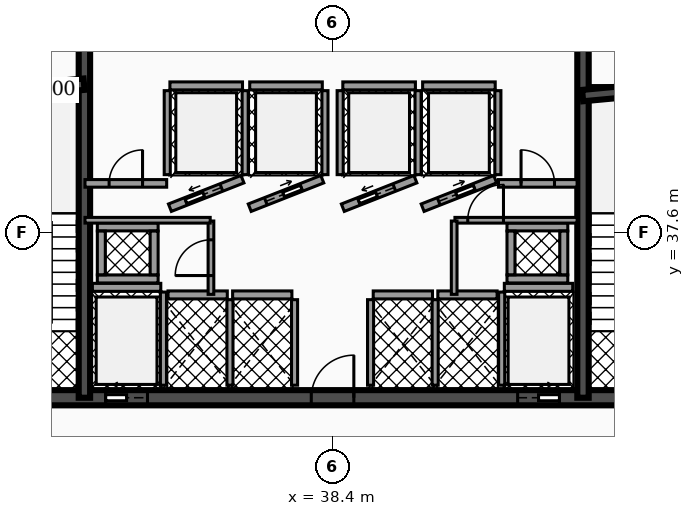
"""IFC4 building model, lengths in metres.
Left out: names, types, materials, properties, quantities, classifications, styles, units other than length and angle.
Written with IfcOpenShell. Run it as: python <this file> out.ifc"""

import sys

from ifc_helpers import new_model, si_unit, direction, frame, frame_2d, origin, place, context, subcontext, project, spatial, rectangle, extrude, element, fill, save


model = new_model("IFC4")
c1 = context("Model", 3, precision=1e-05, world=origin(), true_north=direction((0.0, 1.0)))
c2 = subcontext(c1, "Body", "Model", "MODEL_VIEW")
j1 = project(units=[si_unit("LENGTHUNIT", "METRE"), si_unit("PLANEANGLEUNIT", "RADIAN")], contexts=[c1])
p1 = place(None, origin())
s1 = spatial("IfcSite", under=j1, at=p1, CompositionType="ELEMENT")
p2 = place(p1, origin())
s2 = spatial("IfcBuilding", under=s1, at=p2, CompositionType="ELEMENT")
p3 = place(p2, frame((0.0, 0.0, 100.98)))
s3 = spatial("IfcBuildingStorey", under=s2, at=p3, CompositionType="ELEMENT", Elevation=100.98)
p4 = place(p3, frame((28.4, 33.25, 0.0), z_axis=(0.0, 0.0, 1.0), x_axis=(1.0, 0.0, 0.0)))
e1 = element("IfcWall", 1, at=p4, inside=s3, PredefinedType="SHEAR", context=c2, shape_type="SweptSolid", body=[
    extrude(rectangle(XDim=20.06, YDim=0.4, at=frame_2d((10.03, 0.0))), origin(), (0.0, 0.0, 1.0), 3.82),
])
p5 = place(p4, frame((4.03, 0.0, 0.0)))
e2 = element("IfcOpeningElement", 2, at=p5, cuts=e1, PredefinedType="OPENING", context=c2, shape_type="SweptSolid", body=[
    extrude(rectangle(XDim=1.1, YDim=2.15, at=frame_2d((0.55, 1.075))), frame((0.0, 0.21, 0.0), z_axis=(0.0, -1.0, 0.0), x_axis=(1.0, 0.0, 0.0)), (0.0, 0.0, 1.0), 0.42),
])
p6 = place(p4, frame((14.87, 0.0, 0.0)))
e3 = element("IfcOpeningElement", 3, at=p6, cuts=e1, PredefinedType="OPENING", context=c2, shape_type="SweptSolid", body=[
    extrude(rectangle(XDim=1.1, YDim=2.15, at=frame_2d((0.55, 1.075))), frame((0.0, 0.21, 0.0), z_axis=(0.0, -1.0, 0.0), x_axis=(1.0, 0.0, 0.0)), (0.0, 0.0, 1.0), 0.42),
])
p7 = place(p4, frame((1.31, 0.0, 0.0)))
e4 = element("IfcOpeningElement", 4, at=p7, cuts=e1, PredefinedType="OPENING", context=c2, shape_type="SweptSolid", body=[
    extrude(rectangle(XDim=1.1, YDim=2.2, at=frame_2d((0.55, 1.1))), frame((0.0, 0.21, 0.0), z_axis=(0.0, -1.0, 0.0), x_axis=(1.0, 0.0, 0.0)), (0.0, 0.0, 1.0), 0.42),
])
p8 = place(p4, frame((9.44, 0.0, 0.0)))
e5 = element("IfcOpeningElement", 5, at=p8, cuts=e1, PredefinedType="OPENING", context=c2, shape_type="SweptSolid", body=[
    extrude(rectangle(XDim=1.12, YDim=2.05, at=frame_2d((0.56, 1.025))), frame((0.0, 0.21, 0.0), z_axis=(0.0, -1.0, 0.0), x_axis=(1.0, 0.0, 0.0)), (0.0, 0.0, 1.0), 0.42),
])
p9 = place(p4, frame((17.65, 0.0, 0.0)))
e6 = element("IfcOpeningElement", 6, at=p9, cuts=e1, PredefinedType="OPENING", context=c2, shape_type="SweptSolid", body=[
    extrude(rectangle(XDim=1.1, YDim=2.2, at=frame_2d((0.55, 1.1))), frame((0.0, 0.21, 0.0), z_axis=(0.0, -1.0, 0.0), x_axis=(1.0, 0.0, 0.0)), (0.0, 0.0, 1.0), 0.42),
])
for number, where, z_axis, x_axis in (
    (7, (31.87, 33.25, 0.0), (0.0, 0.0, 1.0), (0.0, 1.0, 0.0)),
    (8, (44.99, 33.25, 0.0), (0.0, 0.0, 1.0), (0.0, 1.0, 0.0)),
):
    element("IfcWall", number, at=place(p3, frame(where, z_axis=z_axis, x_axis=x_axis)), inside=s3, PredefinedType="SHEAR", context=c2, shape_type="SweptSolid", body=[
        extrude(rectangle(XDim=10.2, YDim=0.3, at=frame_2d((5.1, 0.0))), origin(), (0.0, 0.0, 1.0), 3.82),
    ])
p10 = place(p3, frame((28.64, 41.2, 0.0), z_axis=(0.0, 0.0, 1.0), x_axis=(0.995687118776, 0.092774789157, 0.0)))
e9 = element("IfcWall", 9, at=p10, inside=s3, PredefinedType="SHEAR", context=c2, shape_type="SweptSolid", body=[
    extrude(rectangle(XDim=3.234, YDim=0.3, at=frame_2d((1.617, 0.0))), origin(), (0.0, 0.0, 1.0), 3.82),
])
p11 = place(p3, frame((44.98, 41.2, 0.0), z_axis=(0.0, 0.0, 1.0), x_axis=(0.995686468965, 0.09278176286, 0.0)))
e10 = element("IfcWall", 10, at=p11, inside=s3, PredefinedType="SHEAR", context=c2, shape_type="SweptSolid", body=[
    extrude(rectangle(XDim=3.234, YDim=0.3, at=frame_2d((1.617, 0.0))), origin(), (0.0, 0.0, 1.0), 3.82),
])
p12 = place(p3, frame((32.08, 36.155, 0.0), z_axis=(0.0, 0.0, 1.0), x_axis=(1.0, 0.0, 0.0)))
e11 = element("IfcWall", 11, at=p12, inside=s3, PredefinedType="SOLIDWALL", context=c2, shape_type="SweptSolid", body=[
    extrude(rectangle(XDim=1.8, YDim=0.21, at=frame_2d((0.9, 0.0))), origin(), (0.0, 0.0, 1.0), 2.792),
])
p13 = place(p3, frame((33.95, 33.58, 0.0), z_axis=(0.0, 0.0, 1.0), x_axis=(0.0, 1.0, 0.0)))
e12 = element("IfcWall", 12, at=p13, inside=s3, PredefinedType="SOLIDWALL", context=c2, shape_type="SweptSolid", body=[
    extrude(rectangle(XDim=2.45, YDim=0.16, at=frame_2d((1.225, 0.0))), origin(), (0.0, 0.0, 1.0), 2.792),
])
p14 = place(p3, frame((42.92, 36.155, 0.0), z_axis=(0.0, 0.0, 1.0), x_axis=(1.0, 0.0, 0.0)))
e13 = element("IfcWall", 13, at=p14, inside=s3, PredefinedType="SOLIDWALL", context=c2, shape_type="SweptSolid", body=[
    extrude(rectangle(XDim=1.8, YDim=0.21, at=frame_2d((0.9, 0.0))), origin(), (0.0, 0.0, 1.0), 2.792),
])
p15 = place(p3, frame((42.85, 33.58, 0.0), z_axis=(0.0, 0.0, 1.0), x_axis=(0.0, 1.0, 0.0)))
e14 = element("IfcWall", 14, at=p15, inside=s3, PredefinedType="SOLIDWALL", context=c2, shape_type="SweptSolid", body=[
    extrude(rectangle(XDim=2.45, YDim=0.16, at=frame_2d((1.225, 0.0))), origin(), (0.0, 0.0, 1.0), 2.792),
])
p16 = place(p3, frame((34.12, 38.25, 0.0), z_axis=(0.0, 0.0, 1.0), x_axis=(0.930804993012, 0.36551616241, 0.0)))
e15 = element("IfcWall", 15, at=p16, inside=s3, PredefinedType="SOLIDWALL", context=c2, shape_type="SweptSolid", body=[
    extrude(rectangle(XDim=2.052, YDim=0.21, at=frame_2d((1.026, 0.0))), origin(), (0.0, 0.0, 1.0), 2.792),
])
p17 = place(p16, frame((0.455, 0.0, 0.0)))
e16 = element("IfcOpeningElement", 16, at=p17, cuts=e15, PredefinedType="OPENING", context=c2, shape_type="SweptSolid", body=[
    extrude(rectangle(XDim=1.0, YDim=2.1, at=frame_2d((0.5, 1.05))), frame((0.0, 0.115, 0.0), z_axis=(0.0, -1.0, 0.0), x_axis=(1.0, 0.0, 0.0)), (0.0, 0.0, 1.0), 0.23),
])
p18 = place(p3, frame((34.12, 41.455, 0.0), z_axis=(0.0, 0.0, 1.0), x_axis=(1.0, 0.0, 0.0)))
e17 = element("IfcWall", 17, at=p18, inside=s3, PredefinedType="SOLIDWALL", context=c2, shape_type="SweptSolid", body=[
    extrude(rectangle(XDim=1.91, YDim=0.21, at=frame_2d((0.955, 0.0))), origin(), (0.0, 0.0, 1.0), 2.792),
])
for number, where, z_axis, x_axis in (
    (18, (34.05, 39.12, 0.0), (0.0, 0.0, 1.0), (0.0, 1.0, 0.0)),
    (19, (36.1, 39.12, 0.0), (0.0, 0.0, 1.0), (0.0, 1.0, 0.0)),
):
    element("IfcWall", number, at=place(p3, frame(where, z_axis=z_axis, x_axis=x_axis)), inside=s3, PredefinedType="SOLIDWALL", context=c2, shape_type="SweptSolid", body=[
        extrude(rectangle(XDim=2.21, YDim=0.16, at=frame_2d((1.105, 0.0))), origin(), (0.0, 0.0, 1.0), 2.792),
    ])
p19 = place(p3, frame((36.22, 38.25, 0.0), z_axis=(0.0, 0.0, 1.0), x_axis=(0.930804993012, 0.36551616241, 0.0)))
e20 = element("IfcWall", 20, at=p19, inside=s3, PredefinedType="SOLIDWALL", context=c2, shape_type="SweptSolid", body=[
    extrude(rectangle(XDim=2.052, YDim=0.21, at=frame_2d((1.026, 0.0))), origin(), (0.0, 0.0, 1.0), 2.792),
])
p20 = place(p19, frame((0.455, 0.0, 0.0)))
e21 = element("IfcOpeningElement", 21, at=p20, cuts=e20, PredefinedType="OPENING", context=c2, shape_type="SweptSolid", body=[
    extrude(rectangle(XDim=1.0, YDim=2.1, at=frame_2d((0.5, 1.05))), frame((0.0, 0.115, 0.0), z_axis=(0.0, -1.0, 0.0), x_axis=(1.0, 0.0, 0.0)), (0.0, 0.0, 1.0), 0.23),
])
p21 = place(p3, frame((36.22, 41.455, 0.0), z_axis=(0.0, 0.0, 1.0), x_axis=(1.0, 0.0, 0.0)))
e22 = element("IfcWall", 22, at=p21, inside=s3, PredefinedType="SOLIDWALL", context=c2, shape_type="SweptSolid", body=[
    extrude(rectangle(XDim=1.91, YDim=0.21, at=frame_2d((0.955, 0.0))), origin(), (0.0, 0.0, 1.0), 2.792),
])
p22 = place(p3, frame((38.2, 39.12, 0.0), z_axis=(0.0, 0.0, 1.0), x_axis=(0.0, 1.0, 0.0)))
e23 = element("IfcWall", 23, at=p22, inside=s3, PredefinedType="SOLIDWALL", context=c2, shape_type="SweptSolid", body=[
    extrude(rectangle(XDim=2.21, YDim=0.16, at=frame_2d((1.105, 0.0))), origin(), (0.0, 0.0, 1.0), 2.792),
])
p23 = place(p3, frame((38.67, 38.25, 0.0), z_axis=(0.0, 0.0, 1.0), x_axis=(0.930820886763, 0.3654756856, 0.0)))
e24 = element("IfcWall", 24, at=p23, inside=s3, PredefinedType="SOLIDWALL", context=c2, shape_type="SweptSolid", body=[
    extrude(rectangle(XDim=2.052, YDim=0.21, at=frame_2d((1.026, 0.0))), origin(), (0.0, 0.0, 1.0), 2.792),
])
p24 = place(p23, frame((0.455, 0.0, 0.0)))
e25 = element("IfcOpeningElement", 25, at=p24, cuts=e24, PredefinedType="OPENING", context=c2, shape_type="SweptSolid", body=[
    extrude(rectangle(XDim=1.0, YDim=2.1, at=frame_2d((0.5, 1.05))), frame((0.0, 0.115, 0.0), z_axis=(0.0, -1.0, 0.0), x_axis=(1.0, 0.0, 0.0)), (0.0, 0.0, 1.0), 0.23),
])
p25 = place(p3, frame((38.67, 41.455, 0.0), z_axis=(0.0, 0.0, 1.0), x_axis=(1.0, 0.0, 0.0)))
e26 = element("IfcWall", 26, at=p25, inside=s3, PredefinedType="SOLIDWALL", context=c2, shape_type="SweptSolid", body=[
    extrude(rectangle(XDim=1.91, YDim=0.21, at=frame_2d((0.955, 0.0))), origin(), (0.0, 0.0, 1.0), 2.792),
])
for number, where, z_axis, x_axis in (
    (27, (38.6, 39.12, 0.0), (0.0, 0.0, 1.0), (0.0, 1.0, 0.0)),
    (28, (40.65, 39.12, 0.0), (0.0, 0.0, 1.0), (0.0, 1.0, 0.0)),
):
    element("IfcWall", number, at=place(p3, frame(where, z_axis=z_axis, x_axis=x_axis)), inside=s3, PredefinedType="SOLIDWALL", context=c2, shape_type="SweptSolid", body=[
        extrude(rectangle(XDim=2.21, YDim=0.16, at=frame_2d((1.105, 0.0))), origin(), (0.0, 0.0, 1.0), 2.792),
    ])
p26 = place(p3, frame((40.77, 38.25, 0.0), z_axis=(0.0, 0.0, 1.0), x_axis=(0.930804993012, 0.36551616241, 0.0)))
e29 = element("IfcWall", 29, at=p26, inside=s3, PredefinedType="SOLIDWALL", context=c2, shape_type="SweptSolid", body=[
    extrude(rectangle(XDim=2.052, YDim=0.21, at=frame_2d((1.026, 0.0))), origin(), (0.0, 0.0, 1.0), 2.792),
])
p27 = place(p26, frame((0.455, 0.0, 0.0)))
e30 = element("IfcOpeningElement", 30, at=p27, cuts=e29, PredefinedType="OPENING", context=c2, shape_type="SweptSolid", body=[
    extrude(rectangle(XDim=1.0, YDim=2.1, at=frame_2d((0.5, 1.05))), frame((0.0, 0.115, 0.0), z_axis=(0.0, -1.0, 0.0), x_axis=(1.0, 0.0, 0.0)), (0.0, 0.0, 1.0), 0.23),
])
p28 = place(p3, frame((40.77, 41.455, 0.0), z_axis=(0.0, 0.0, 1.0), x_axis=(1.0, 0.0, 0.0)))
e31 = element("IfcWall", 31, at=p28, inside=s3, PredefinedType="SOLIDWALL", context=c2, shape_type="SweptSolid", body=[
    extrude(rectangle(XDim=1.91, YDim=0.21, at=frame_2d((0.955, 0.0))), origin(), (0.0, 0.0, 1.0), 2.792),
])
p29 = place(p3, frame((42.75, 39.12, 0.0), z_axis=(0.0, 0.0, 1.0), x_axis=(0.0, 1.0, 0.0)))
e32 = element("IfcWall", 32, at=p29, inside=s3, PredefinedType="SOLIDWALL", context=c2, shape_type="SweptSolid", body=[
    extrude(rectangle(XDim=2.21, YDim=0.16, at=frame_2d((1.105, 0.0))), origin(), (0.0, 0.0, 1.0), 2.792),
])
p30 = place(p3, frame((34.07, 35.955, 0.0), z_axis=(0.0, 0.0, 1.0), x_axis=(1.0, 0.0, 0.0)))
e33 = element("IfcWall", 33, at=p30, inside=s3, PredefinedType="SOLIDWALL", context=c2, shape_type="SweptSolid", body=[
    extrude(rectangle(XDim=1.56, YDim=0.21, at=frame_2d((0.78, 0.0))), origin(), (0.0, 0.0, 1.0), 2.792),
])
p31 = place(p3, frame((35.7, 33.58, 0.0), z_axis=(0.0, 0.0, 1.0), x_axis=(0.0, 1.0, 0.0)))
e34 = element("IfcWall", 34, at=p31, inside=s3, PredefinedType="SOLIDWALL", context=c2, shape_type="SweptSolid", body=[
    extrude(rectangle(XDim=2.25, YDim=0.16, at=frame_2d((1.125, 0.0))), origin(), (0.0, 0.0, 1.0), 2.792),
])
p32 = place(p3, frame((35.77, 35.955, 0.0), z_axis=(0.0, 0.0, 1.0), x_axis=(1.0, 0.0, 0.0)))
e35 = element("IfcWall", 35, at=p32, inside=s3, PredefinedType="SOLIDWALL", context=c2, shape_type="SweptSolid", body=[
    extrude(rectangle(XDim=1.56, YDim=0.21, at=frame_2d((0.78, 0.0))), origin(), (0.0, 0.0, 1.0), 2.792),
])
p33 = place(p3, frame((37.4, 33.58, 0.0), z_axis=(0.0, 0.0, 1.0), x_axis=(0.0, 1.0, 0.0)))
e36 = element("IfcWall", 36, at=p33, inside=s3, PredefinedType="SOLIDWALL", context=c2, shape_type="SweptSolid", body=[
    extrude(rectangle(XDim=2.25, YDim=0.16, at=frame_2d((1.125, 0.0))), origin(), (0.0, 0.0, 1.0), 2.792),
])
p34 = place(p3, frame((39.47, 35.955, 0.0), z_axis=(0.0, 0.0, 1.0), x_axis=(1.0, 0.0, 0.0)))
e37 = element("IfcWall", 37, at=p34, inside=s3, PredefinedType="SOLIDWALL", context=c2, shape_type="SweptSolid", body=[
    extrude(rectangle(XDim=1.56, YDim=0.21, at=frame_2d((0.78, 0.0))), origin(), (0.0, 0.0, 1.0), 2.792),
])
for number, where, z_axis, x_axis in (
    (38, (39.4, 33.58, 0.0), (0.0, 0.0, 1.0), (0.0, 1.0, 0.0)),
    (39, (41.1, 33.58, 0.0), (0.0, 0.0, 1.0), (0.0, 1.0, 0.0)),
):
    element("IfcWall", number, at=place(p3, frame(where, z_axis=z_axis, x_axis=x_axis)), inside=s3, PredefinedType="SOLIDWALL", context=c2, shape_type="SweptSolid", body=[
        extrude(rectangle(XDim=2.25, YDim=0.16, at=frame_2d((1.125, 0.0))), origin(), (0.0, 0.0, 1.0), 2.792),
    ])
p35 = place(p3, frame((41.17, 35.955, 0.0), z_axis=(0.0, 0.0, 1.0), x_axis=(1.0, 0.0, 0.0)))
e40 = element("IfcWall", 40, at=p35, inside=s3, PredefinedType="SOLIDWALL", context=c2, shape_type="SweptSolid", body=[
    extrude(rectangle(XDim=1.56, YDim=0.21, at=frame_2d((0.78, 0.0))), origin(), (0.0, 0.0, 1.0), 2.792),
])
for number, where, z_axis, x_axis in (
    (41, (32.21, 36.375, 0.0), (0.0, 0.0, 1.0), (1.0, 0.0, 0.0)),
    (42, (32.21, 37.745, 0.0), (0.0, 0.0, 1.0), (1.0, 0.0, 0.0)),
):
    element("IfcWall", number, at=place(p3, frame(where, z_axis=z_axis, x_axis=x_axis)), inside=s3, PredefinedType="SOLIDWALL", context=c2, shape_type="SweptSolid", body=[
        extrude(rectangle(XDim=1.6, YDim=0.21, at=frame_2d((0.8, 0.0))), origin(), (0.0, 0.0, 1.0), 3.82),
    ])
for number, where, z_axis, x_axis in (
    (43, (32.315, 36.485, 0.0), (0.0, 0.0, 1.0), (0.0, 1.0, 0.0)),
    (44, (33.705, 36.485, 0.0), (0.0, 0.0, 1.0), (0.0, 1.0, 0.0)),
):
    element("IfcWall", number, at=place(p3, frame(where, z_axis=z_axis, x_axis=x_axis)), inside=s3, PredefinedType="SOLIDWALL", context=c2, shape_type="SweptSolid", body=[
        extrude(rectangle(XDim=1.15, YDim=0.21, at=frame_2d((0.575, 0.0))), origin(), (0.0, 0.0, 1.0), 3.82),
    ])
for number, where, z_axis, x_axis in (
    (45, (42.99, 36.375, 0.0), (0.0, 0.0, 1.0), (1.0, 0.0, 0.0)),
    (46, (42.99, 37.745, 0.0), (0.0, 0.0, 1.0), (1.0, 0.0, 0.0)),
):
    element("IfcWall", number, at=place(p3, frame(where, z_axis=z_axis, x_axis=x_axis)), inside=s3, PredefinedType="SOLIDWALL", context=c2, shape_type="SweptSolid", body=[
        extrude(rectangle(XDim=1.6, YDim=0.21, at=frame_2d((0.8, 0.0))), origin(), (0.0, 0.0, 1.0), 3.82),
    ])
for number, where, z_axis, x_axis in (
    (47, (43.095, 36.485, 0.0), (0.0, 0.0, 1.0), (0.0, 1.0, 0.0)),
    (48, (44.485, 36.485, 0.0), (0.0, 0.0, 1.0), (0.0, 1.0, 0.0)),
):
    element("IfcWall", number, at=place(p3, frame(where, z_axis=z_axis, x_axis=x_axis)), inside=s3, PredefinedType="SOLIDWALL", context=c2, shape_type="SweptSolid", body=[
        extrude(rectangle(XDim=1.15, YDim=0.21, at=frame_2d((0.575, 0.0))), origin(), (0.0, 0.0, 1.0), 3.82),
    ])
p36 = place(p3, frame((35.2, 35.97, 0.0), z_axis=(0.0, 0.0, 1.0), x_axis=(0.0, 1.0, 0.0)))
e49 = element("IfcWall", 49, at=p36, inside=s3, PredefinedType="PARTITIONING", context=c2, shape_type="SweptSolid", body=[
    extrude(rectangle(XDim=1.93, YDim=0.15, at=frame_2d((0.965, 0.0))), origin(), (0.0, 0.0, 1.0), 2.777),
])
p37 = place(p36, frame((0.495, 0.0, 0.0)))
e50 = element("IfcOpeningElement", 50, at=p37, cuts=e49, PredefinedType="OPENING", context=c2, shape_type="SweptSolid", body=[
    extrude(rectangle(XDim=0.94, YDim=2.05, at=frame_2d((0.47, 1.025))), frame((0.0, 0.085, 0.0), z_axis=(0.0, -1.0, 0.0), x_axis=(1.0, 0.0, 0.0)), (0.0, 0.0, 1.0), 0.17),
])
p38 = place(p3, frame((31.885, 37.92, 0.0), z_axis=(0.0, 0.0, 1.0), x_axis=(1.0, 0.0, 0.0)))
e51 = element("IfcWall", 51, at=p38, inside=s3, PredefinedType="PARTITIONING", context=c2, shape_type="SweptSolid", body=[
    extrude(rectangle(XDim=3.295, YDim=0.15, at=frame_2d((1.647, 0.0))), origin(), (0.0, 0.0, 1.0), 2.777),
])
p39 = place(p3, frame((31.885, 38.89, 0.0), z_axis=(0.0, 0.0, 1.0), x_axis=(1.0, 0.0, 0.0)))
e52 = element("IfcWall", 52, at=p39, inside=s3, PredefinedType="PARTITIONING", context=c2, shape_type="SweptSolid", body=[
    extrude(rectangle(XDim=2.15, YDim=0.2, at=frame_2d((1.075, 0.0))), origin(), (0.0, 0.0, 1.0), 2.777),
])
p40 = place(p39, frame((0.635, 0.0, 0.0)))
e53 = element("IfcOpeningElement", 53, at=p40, cuts=e52, PredefinedType="OPENING", context=c2, shape_type="SweptSolid", body=[
    extrude(rectangle(XDim=0.88, YDim=2.05, at=frame_2d((0.44, 1.025))), frame((0.0, 0.11, 0.0), z_axis=(0.0, -1.0, 0.0), x_axis=(1.0, 0.0, 0.0)), (0.0, 0.0, 1.0), 0.22),
])
p41 = place(p3, frame((42.765, 38.89, 0.0), z_axis=(0.0, 0.0, 1.0), x_axis=(1.0, 0.0, 0.0)))
e54 = element("IfcWall", 54, at=p41, inside=s3, PredefinedType="PARTITIONING", context=c2, shape_type="SweptSolid", body=[
    extrude(rectangle(XDim=2.07, YDim=0.2, at=frame_2d((1.035, 0.0))), origin(), (0.0, 0.0, 1.0), 2.777),
])
p42 = place(p41, frame((0.595, 0.0, 0.0)))
e55 = element("IfcOpeningElement", 55, at=p42, cuts=e54, PredefinedType="OPENING", context=c2, shape_type="SweptSolid", body=[
    extrude(rectangle(XDim=0.88, YDim=2.05, at=frame_2d((0.44, 1.025))), frame((0.0, 0.11, 0.0), z_axis=(0.0, -1.0, 0.0), x_axis=(1.0, 0.0, 0.0)), (0.0, 0.0, 1.0), 0.22),
])
p43 = place(p3, frame((41.62, 37.92, 0.0), z_axis=(0.0, 0.0, 1.0), x_axis=(1.0, 0.0, 0.0)))
e56 = element("IfcWall", 56, at=p43, inside=s3, PredefinedType="PARTITIONING", context=c2, shape_type="SweptSolid", body=[
    extrude(rectangle(XDim=3.215, YDim=0.15, at=frame_2d((1.607, 0.0))), origin(), (0.0, 0.0, 1.0), 2.777),
])
p44 = place(p43, frame((0.337, 0.0, 0.0)))
e57 = element("IfcOpeningElement", 57, at=p44, cuts=e56, PredefinedType="OPENING", context=c2, shape_type="SweptSolid", body=[
    extrude(rectangle(XDim=0.94, YDim=2.05, at=frame_2d((0.47, 1.025))), frame((0.0, 0.085, 0.0), z_axis=(0.0, -1.0, 0.0), x_axis=(1.0, 0.0, 0.0)), (0.0, 0.0, 1.0), 0.17),
])
p45 = place(p3, frame((41.6, 35.97, 0.0), z_axis=(0.0, 0.0, 1.0), x_axis=(0.0, 1.0, 0.0)))
e58 = element("IfcWall", 58, at=p45, inside=s3, PredefinedType="PARTITIONING", context=c2, shape_type="SweptSolid", body=[
    extrude(rectangle(XDim=1.93, YDim=0.15, at=frame_2d((0.965, 0.0))), origin(), (0.0, 0.0, 1.0), 2.777),
])
p46 = place(p5, origin())
e59 = element("IfcDoor", 59, at=p46, inside=s3, OperationType="SLIDING_TO_LEFT", PredefinedType="DOOR", context=c2, shape_type="SweptSolid", body=[
    extrude(rectangle(XDim=1.1, YDim=2.15, at=frame_2d((0.55, 1.075))), frame((0.0, 0.025, 0.0), z_axis=(0.0, -1.0, 0.0), x_axis=(1.0, 0.0, 0.0)), (0.0, 0.0, 1.0), 0.05),
])
fill(e2, e59)
p47 = place(p6, origin())
e60 = element("IfcDoor", 60, at=p47, inside=s3, OperationType="SLIDING_TO_RIGHT", PredefinedType="DOOR", context=c2, shape_type="SweptSolid", body=[
    extrude(rectangle(XDim=1.1, YDim=2.15, at=frame_2d((0.55, 1.075))), frame((0.0, 0.025, 0.0), z_axis=(0.0, -1.0, 0.0), x_axis=(1.0, 0.0, 0.0)), (0.0, 0.0, 1.0), 0.05),
])
fill(e3, e60)
p48 = place(p17, origin())
e61 = element("IfcDoor", 61, at=p48, inside=s3, OperationType="SLIDING_TO_LEFT", PredefinedType="DOOR", context=c2, shape_type="SweptSolid", body=[
    extrude(rectangle(XDim=1.0, YDim=2.1, at=frame_2d((0.5, 1.05))), frame((0.0, 0.025, 0.0), z_axis=(0.0, -1.0, 0.0), x_axis=(1.0, 0.0, 0.0)), (0.0, 0.0, 1.0), 0.05),
])
fill(e16, e61)
p49 = place(p20, origin())
e62 = element("IfcDoor", 62, at=p49, inside=s3, OperationType="SLIDING_TO_RIGHT", PredefinedType="DOOR", context=c2, shape_type="SweptSolid", body=[
    extrude(rectangle(XDim=1.0, YDim=2.1, at=frame_2d((0.5, 1.05))), frame((0.0, 0.025, 0.0), z_axis=(0.0, -1.0, 0.0), x_axis=(1.0, 0.0, 0.0)), (0.0, 0.0, 1.0), 0.05),
])
fill(e21, e62)
p50 = place(p24, origin())
e63 = element("IfcDoor", 63, at=p50, inside=s3, OperationType="SLIDING_TO_LEFT", PredefinedType="DOOR", context=c2, shape_type="SweptSolid", body=[
    extrude(rectangle(XDim=1.0, YDim=2.1, at=frame_2d((0.5, 1.05))), frame((0.0, 0.025, 0.0), z_axis=(0.0, -1.0, 0.0), x_axis=(1.0, 0.0, 0.0)), (0.0, 0.0, 1.0), 0.05),
])
fill(e25, e63)
p51 = place(p27, origin())
e64 = element("IfcDoor", 64, at=p51, inside=s3, OperationType="SLIDING_TO_RIGHT", PredefinedType="DOOR", context=c2, shape_type="SweptSolid", body=[
    extrude(rectangle(XDim=1.0, YDim=2.1, at=frame_2d((0.5, 1.05))), frame((0.0, 0.025, 0.0), z_axis=(0.0, -1.0, 0.0), x_axis=(1.0, 0.0, 0.0)), (0.0, 0.0, 1.0), 0.05),
])
fill(e30, e64)
p52 = place(p8, origin())
e65 = element("IfcDoor", 65, at=p52, inside=s3, OperationType="SINGLE_SWING_RIGHT", PredefinedType="DOOR", context=c2, shape_type="SweptSolid", body=[
    extrude(rectangle(XDim=1.12, YDim=2.05, at=frame_2d((0.56, 1.025))), frame((0.0, 0.025, 0.0), z_axis=(0.0, -1.0, 0.0), x_axis=(1.0, 0.0, 0.0)), (0.0, 0.0, 1.0), 0.05),
])
fill(e5, e65)
p53 = place(p37, origin())
e66 = element("IfcDoor", 66, at=p53, inside=s3, OperationType="SINGLE_SWING_LEFT", PredefinedType="DOOR", context=c2, shape_type="SweptSolid", body=[
    extrude(rectangle(XDim=0.94, YDim=2.05, at=frame_2d((0.47, 1.025))), frame((0.0, 0.025, 0.0), z_axis=(0.0, -1.0, 0.0), x_axis=(1.0, 0.0, 0.0)), (0.0, 0.0, 1.0), 0.05),
])
fill(e50, e66)
p54 = place(p40, origin())
e67 = element("IfcDoor", 67, at=p54, inside=s3, OperationType="SINGLE_SWING_RIGHT", PredefinedType="DOOR", context=c2, shape_type="SweptSolid", body=[
    extrude(rectangle(XDim=0.88, YDim=2.05, at=frame_2d((0.44, 1.025))), frame((0.0, 0.025, 0.0), z_axis=(0.0, -1.0, 0.0), x_axis=(1.0, 0.0, 0.0)), (0.0, 0.0, 1.0), 0.05),
])
fill(e53, e67)
p55 = place(p42, origin())
e68 = element("IfcDoor", 68, at=p55, inside=s3, OperationType="SINGLE_SWING_LEFT", PredefinedType="DOOR", context=c2, shape_type="SweptSolid", body=[
    extrude(rectangle(XDim=0.88, YDim=2.05, at=frame_2d((0.44, 1.025))), frame((0.0, 0.025, 0.0), z_axis=(0.0, -1.0, 0.0), x_axis=(1.0, 0.0, 0.0)), (0.0, 0.0, 1.0), 0.05),
])
fill(e55, e68)
p56 = place(p44, origin())
e69 = element("IfcDoor", 69, at=p56, inside=s3, OperationType="SINGLE_SWING_RIGHT", PredefinedType="DOOR", context=c2, shape_type="SweptSolid", body=[
    extrude(rectangle(XDim=0.94, YDim=2.05, at=frame_2d((0.47, 1.025))), frame((0.0, 0.025, 0.0), z_axis=(0.0, -1.0, 0.0), x_axis=(1.0, 0.0, 0.0)), (0.0, 0.0, 1.0), 0.05),
])
fill(e57, e69)
save(model, sys.argv[1])
